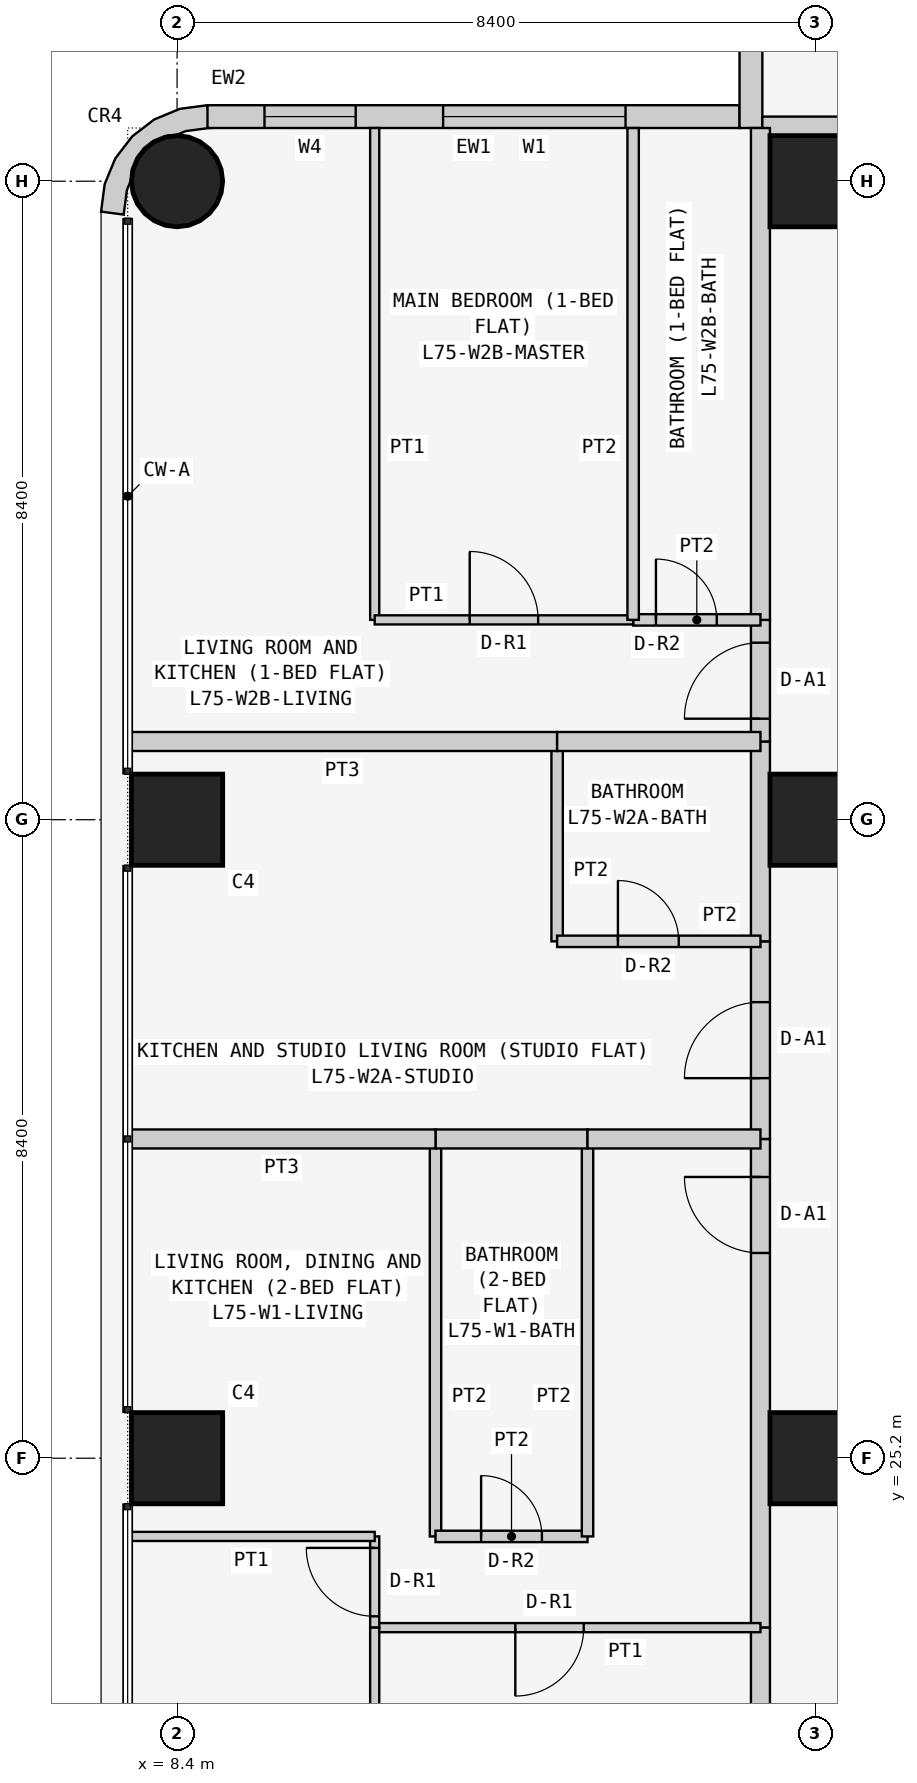
"""IFC4 building model, lengths in metres.
Left out: names, types, materials, properties, quantities, classifications, styles, units other than length and angle.
Written with IfcOpenShell. Run it as: python <this file> out.ifc"""

import sys

from ifc_helpers import new_model, si_unit, direction, frame, frame_2d, origin, origin_2d, place, context, subcontext, project, spatial, polyline, rectangle, circle, outline, extrude, element, fill, save


model = new_model("IFC4")
c1 = context("Model", 3, precision=1e-05, world=origin(), true_north=direction((0.0, 1.0)))
c2 = subcontext(c1, "Body", "Model", "MODEL_VIEW")
j1 = project(units=[si_unit("LENGTHUNIT", "METRE"), si_unit("PLANEANGLEUNIT", "RADIAN")], contexts=[c1])
p1 = place(None, origin())
s1 = spatial("IfcSite", under=j1, at=p1, CompositionType="ELEMENT")
p2 = place(p1, origin())
s2 = spatial("IfcBuilding", under=s1, at=p2, CompositionType="ELEMENT")
p3 = place(p2, frame((0.0, 0.0, 286.5)))
s3 = spatial("IfcBuildingStorey", under=s2, at=p3, CompositionType="ELEMENT", Elevation=286.5)
for number, where, z_axis, x_axis in (
    (1, (8.4, 25.2, 0.0), (0.0, 0.0, 1.0), (1.0, 0.0, 0.0)),
    (2, (8.4, 33.6, 0.0), (0.0, 0.0, 1.0), (1.0, 0.0, 0.0)),
):
    element("IfcColumn", number, at=place(p3, frame(where, z_axis=z_axis, x_axis=x_axis)), inside=s3, PredefinedType="COLUMN", context=c2, shape_type="SweptSolid", body=[
        extrude(rectangle(XDim=1.2, YDim=1.2, at=origin_2d()), origin(), (0.0, 0.0, 1.0), 3.6),
    ])
p4 = place(p3, frame((8.4, 42.0, 0.0), z_axis=(0.0, 0.0, 1.0), x_axis=(1.0, 0.0, 0.0)))
e3 = element("IfcColumn", 3, at=p4, inside=s3, PredefinedType="COLUMN", context=c2, shape_type="SweptSolid", body=[
    extrude(circle(Radius=0.6, at=origin_2d()), origin(), (0.0, 0.0, 1.0), 3.6),
])
for number, where, z_axis, x_axis in (
    (4, (16.8, 25.2, 0.0), (0.0, 0.0, 1.0), (1.0, 0.0, 0.0)),
    (5, (16.8, 33.6, 0.0), (0.0, 0.0, 1.0), (1.0, 0.0, 0.0)),
    (6, (16.8, 42.0, 0.0), (0.0, 0.0, 1.0), (1.0, 0.0, 0.0)),
):
    element("IfcColumn", number, at=place(p3, frame(where, z_axis=z_axis, x_axis=x_axis)), inside=s3, PredefinedType="COLUMN", context=c2, shape_type="SweptSolid", body=[
        extrude(rectangle(XDim=1.2, YDim=1.2, at=origin_2d()), origin(), (0.0, 0.0, 1.0), 3.6),
    ])
p5 = place(p3, frame((15.8, 42.85, 0.0), z_axis=(0.0, 0.0, 1.0), x_axis=(-1.0, 0.0, 0.0)))
e7 = element("IfcWall", 7, at=p5, inside=s3, PredefinedType="SOLIDWALL", context=c2, shape_type="SweptSolid", body=[
    extrude(rectangle(XDim=7.0, YDim=0.3, at=frame_2d((3.5, 0.0))), origin(), (0.0, 0.0, 1.0), 3.45),
])
p6 = place(p5, frame((1.5, 0.0, 0.9)))
e8 = element("IfcOpeningElement", 8, at=p6, cuts=e7, PredefinedType="OPENING", context=c2, shape_type="SweptSolid", body=[
    extrude(rectangle(XDim=2.4, YDim=1.5, at=frame_2d((1.2, 0.75))), frame((0.0, 0.16, 0.0), z_axis=(0.0, -1.0, 0.0), x_axis=(1.0, 0.0, 0.0)), (0.0, 0.0, 1.0), 0.32),
])
p7 = place(p5, frame((5.05, 0.0, 0.9)))
e9 = element("IfcOpeningElement", 9, at=p7, cuts=e7, PredefinedType="OPENING", context=c2, shape_type="SweptSolid", body=[
    extrude(rectangle(XDim=1.2, YDim=1.5, at=frame_2d((0.6, 0.75))), frame((0.0, 0.16, 0.0), z_axis=(0.0, -1.0, 0.0), x_axis=(1.0, 0.0, 0.0)), (0.0, 0.0, 1.0), 0.32),
])
p8 = place(p3, frame((15.95, 50.0, 0.0), z_axis=(0.0, 0.0, 1.0), x_axis=(0.0, -1.0, 0.0)))
e10 = element("IfcWall", 10, at=p8, inside=s3, PredefinedType="SOLIDWALL", context=c2, shape_type="SweptSolid", body=[
    extrude(rectangle(XDim=7.3, YDim=0.3, at=frame_2d((3.65, 0.0))), origin(), (0.0, 0.0, 1.0), 3.45),
])
p9 = place(p8, frame((3.1, 0.0, 0.9)))
e11 = element("IfcOpeningElement", 11, at=p9, cuts=e10, PredefinedType="OPENING", context=c2, shape_type="SweptSolid", body=[
    extrude(rectangle(XDim=2.4, YDim=1.5, at=frame_2d((1.2, 0.75))), frame((0.0, 0.16, 0.0), z_axis=(0.0, -1.0, 0.0), x_axis=(1.0, 0.0, 0.0)), (0.0, 0.0, 1.0), 0.32),
])
p10 = place(p8, frame((0.75, 0.0, 0.9)))
e12 = element("IfcOpeningElement", 12, at=p10, cuts=e10, PredefinedType="OPENING", context=c2, shape_type="SweptSolid", body=[
    extrude(rectangle(XDim=1.2, YDim=1.5, at=frame_2d((0.6, 0.75))), frame((0.0, 0.16, 0.0), z_axis=(0.0, -1.0, 0.0), x_axis=(1.0, 0.0, 0.0)), (0.0, 0.0, 1.0), 0.32),
])
p11 = place(p3, frame((8.762, 42.576, 0.0), z_axis=(0.0, 0.0, 1.0), x_axis=(-0.707106781187, 0.707106781187, 0.0)))
e13 = element("IfcWall", 13, at=p11, inside=s3, PredefinedType="SOLIDWALL", context=c2, shape_type="SweptSolid", body=[
    extrude(outline(polyline([(0.233, 0.114), (0.047, -0.129), (0.033, -0.143), (0.273, -0.327), (0.495, -0.037), (0.635, 0.3), (0.683, 0.663), (0.635, 1.025), (0.495, 1.363), (0.273, 1.653), (0.033, 1.469), (0.047, 1.455), (0.233, 1.212), (0.292, 1.069), (0.358, 1.003), (0.449, 0.783), (0.449, 0.543), (0.358, 0.322), (0.292, 0.257), (0.233, 0.114)])), origin(), (0.0, 0.0, 1.0), 3.45),
])
p12 = place(p3, frame((16.1, 42.725, 0.0), z_axis=(0.0, 0.0, 1.0), x_axis=(1.0, 0.0, 0.0)))
e14 = element("IfcWall", 14, at=p12, inside=s3, PredefinedType="PARTITIONING", context=c2, shape_type="SweptSolid", body=[
    extrude(rectangle(XDim=6.871, YDim=0.25, at=frame_2d((3.436, 0.0))), origin(), (0.0, 0.0, 1.0), 3.45),
])
p13 = place(p3, frame((16.075, 22.971, 0.0), z_axis=(0.0, 0.0, 1.0), x_axis=(0.0, 1.0, 0.0)))
e15 = element("IfcWall", 15, at=p13, inside=s3, PredefinedType="PARTITIONING", context=c2, shape_type="SweptSolid", body=[
    extrude(rectangle(XDim=6.429, YDim=0.25, at=frame_2d((3.214, 0.0))), origin(), (0.0, 0.0, 1.0), 3.45),
])
p14 = place(p13, frame((4.929, 0.0, 0.0)))
e16 = element("IfcOpeningElement", 16, at=p14, cuts=e15, PredefinedType="OPENING", context=c2, shape_type="SweptSolid", body=[
    extrude(rectangle(XDim=1.0, YDim=2.1, at=frame_2d((0.5, 1.05))), frame((0.0, 0.135, 0.0), z_axis=(0.0, -1.0, 0.0), x_axis=(1.0, 0.0, 0.0)), (0.0, 0.0, 1.0), 0.27),
])
p15 = place(p3, frame((16.075, 16.1, 0.0), z_axis=(0.0, 0.0, 1.0), x_axis=(0.0, 1.0, 0.0)))
e17 = element("IfcWall", 17, at=p15, inside=s3, PredefinedType="PARTITIONING", context=c2, shape_type="SweptSolid", body=[
    extrude(rectangle(XDim=6.871, YDim=0.25, at=frame_2d((3.436, 0.0))), origin(), (0.0, 0.0, 1.0), 3.45),
])
p16 = place(p3, frame((16.075, 29.4, 0.0), z_axis=(0.0, 0.0, 1.0), x_axis=(0.0, 1.0, 0.0)))
e18 = element("IfcWall", 18, at=p16, inside=s3, PredefinedType="PARTITIONING", context=c2, shape_type="SweptSolid", body=[
    extrude(rectangle(XDim=2.6, YDim=0.25, at=frame_2d((1.3, 0.0))), origin(), (0.0, 0.0, 1.0), 3.45),
])
p17 = place(p16, frame((0.8, 0.0, 0.0)))
e19 = element("IfcOpeningElement", 19, at=p17, cuts=e18, PredefinedType="OPENING", context=c2, shape_type="SweptSolid", body=[
    extrude(rectangle(XDim=1.0, YDim=2.1, at=frame_2d((0.5, 1.05))), frame((0.0, 0.135, 0.0), z_axis=(0.0, -1.0, 0.0), x_axis=(1.0, 0.0, 0.0)), (0.0, 0.0, 1.0), 0.27),
])
p18 = place(p3, frame((16.075, 32.0, 0.0), z_axis=(0.0, 0.0, 1.0), x_axis=(0.0, 1.0, 0.0)))
e20 = element("IfcWall", 20, at=p18, inside=s3, PredefinedType="PARTITIONING", context=c2, shape_type="SweptSolid", body=[
    extrude(rectangle(XDim=2.629, YDim=0.25, at=frame_2d((1.314, 0.0))), origin(), (0.0, 0.0, 1.0), 3.45),
])
p19 = place(p3, frame((16.075, 34.629, 0.0), z_axis=(0.0, 0.0, 1.0), x_axis=(0.0, 1.0, 0.0)))
e21 = element("IfcWall", 21, at=p19, inside=s3, PredefinedType="PARTITIONING", context=c2, shape_type="SweptSolid", body=[
    extrude(rectangle(XDim=1.6, YDim=0.25, at=frame_2d((0.8, 0.0))), origin(), (0.0, 0.0, 1.0), 3.45),
])
p20 = place(p19, frame((0.3, 0.0, 0.0)))
e22 = element("IfcOpeningElement", 22, at=p20, cuts=e21, PredefinedType="OPENING", context=c2, shape_type="SweptSolid", body=[
    extrude(rectangle(XDim=1.0, YDim=2.1, at=frame_2d((0.5, 1.05))), frame((0.0, 0.135, 0.0), z_axis=(0.0, -1.0, 0.0), x_axis=(1.0, 0.0, 0.0)), (0.0, 0.0, 1.0), 0.27),
])
p21 = place(p3, frame((16.075, 36.229, 0.0), z_axis=(0.0, 0.0, 1.0), x_axis=(0.0, 1.0, 0.0)))
e23 = element("IfcWall", 23, at=p21, inside=s3, PredefinedType="PARTITIONING", context=c2, shape_type="SweptSolid", body=[
    extrude(rectangle(XDim=6.471, YDim=0.25, at=frame_2d((3.235, 0.0))), origin(), (0.0, 0.0, 1.0), 3.45),
])
p22 = place(p3, frame((11.8, 29.4, 0.0), z_axis=(0.0, 0.0, 1.0), x_axis=(0.0, -1.0, 0.0)))
e24 = element("IfcWall", 24, at=p22, inside=s3, PredefinedType="PARTITIONING", context=c2, shape_type="SweptSolid", body=[
    extrude(rectangle(XDim=5.229, YDim=0.15, at=frame_2d((2.615, 0.0))), origin(), (0.0, 0.0, 1.0), 3.45),
])
p23 = place(p3, frame((11.8, 24.171, 0.0), z_axis=(0.0, 0.0, 1.0), x_axis=(1.0, 0.0, 0.0)))
e25 = element("IfcWall", 25, at=p23, inside=s3, PredefinedType="PARTITIONING", context=c2, shape_type="SweptSolid", body=[
    extrude(rectangle(XDim=2.0, YDim=0.15, at=frame_2d((1.0, 0.0))), origin(), (0.0, 0.0, 1.0), 3.45),
])
p24 = place(p23, frame((0.6, 0.0, 0.0)))
e26 = element("IfcOpeningElement", 26, at=p24, cuts=e25, PredefinedType="OPENING", context=c2, shape_type="SweptSolid", body=[
    extrude(rectangle(XDim=0.8, YDim=2.1, at=frame_2d((0.4, 1.05))), frame((0.0, 0.085, 0.0), z_axis=(0.0, -1.0, 0.0), x_axis=(1.0, 0.0, 0.0)), (0.0, 0.0, 1.0), 0.17),
])
p25 = place(p3, frame((13.8, 24.171, 0.0), z_axis=(0.0, 0.0, 1.0), x_axis=(0.0, 1.0, 0.0)))
e27 = element("IfcWall", 27, at=p25, inside=s3, PredefinedType="PARTITIONING", context=c2, shape_type="SweptSolid", body=[
    extrude(rectangle(XDim=5.229, YDim=0.15, at=frame_2d((2.615, 0.0))), origin(), (0.0, 0.0, 1.0), 3.45),
])
p26 = place(p3, frame((13.8, 29.4, 0.0), z_axis=(0.0, 0.0, 1.0), x_axis=(-1.0, 0.0, 0.0)))
e28 = element("IfcWall", 28, at=p26, inside=s3, PredefinedType="PARTITIONING", context=c2, shape_type="SweptSolid", body=[
    extrude(rectangle(XDim=2.0, YDim=0.25, at=frame_2d((1.0, 0.0))), origin(), (0.0, 0.0, 1.0), 3.45),
])
p27 = place(p3, frame((16.075, 22.971, 0.0), z_axis=(0.0, 0.0, 1.0), x_axis=(-1.0, 0.0, 0.0)))
e29 = element("IfcWall", 29, at=p27, inside=s3, PredefinedType="PARTITIONING", context=c2, shape_type="SweptSolid", body=[
    extrude(rectangle(XDim=5.075, YDim=0.12, at=frame_2d((2.538, 0.0))), origin(), (0.0, 0.0, 1.0), 3.45),
])
p28 = place(p27, frame((2.325, 0.0, 0.0)))
e30 = element("IfcOpeningElement", 30, at=p28, cuts=e29, PredefinedType="OPENING", context=c2, shape_type="SweptSolid", body=[
    extrude(rectangle(XDim=0.9, YDim=2.1, at=frame_2d((0.45, 1.05))), frame((0.0, 0.07, 0.0), z_axis=(0.0, -1.0, 0.0), x_axis=(1.0, 0.0, 0.0)), (0.0, 0.0, 1.0), 0.14),
])
p29 = place(p3, frame((11.0, 22.971, 0.0), z_axis=(0.0, 0.0, 1.0), x_axis=(0.0, 1.0, 0.0)))
e31 = element("IfcWall", 31, at=p29, inside=s3, PredefinedType="PARTITIONING", context=c2, shape_type="SweptSolid", body=[
    extrude(rectangle(XDim=1.2, YDim=0.12, at=frame_2d((0.6, 0.0))), origin(), (0.0, 0.0, 1.0), 3.45),
])
p30 = place(p29, frame((0.149, 0.0, 0.0)))
e32 = element("IfcOpeningElement", 32, at=p30, cuts=e31, PredefinedType="OPENING", context=c2, shape_type="SweptSolid", body=[
    extrude(rectangle(XDim=0.9, YDim=2.1, at=frame_2d((0.45, 1.05))), frame((0.0, 0.07, 0.0), z_axis=(0.0, -1.0, 0.0), x_axis=(1.0, 0.0, 0.0)), (0.0, 0.0, 1.0), 0.14),
])
p31 = place(p3, frame((11.0, 24.171, 0.0), z_axis=(0.0, 0.0, 1.0), x_axis=(-1.0, 0.0, 0.0)))
e33 = element("IfcWall", 33, at=p31, inside=s3, PredefinedType="PARTITIONING", context=c2, shape_type="SweptSolid", body=[
    extrude(rectangle(XDim=3.25, YDim=0.12, at=frame_2d((1.625, 0.0))), origin(), (0.0, 0.0, 1.0), 3.45),
])
p32 = place(p3, frame((7.75, 29.4, 0.0), z_axis=(0.0, 0.0, 1.0), x_axis=(1.0, 0.0, 0.0)))
e34 = element("IfcWall", 34, at=p32, inside=s3, PredefinedType="PARTITIONING", context=c2, shape_type="SweptSolid", body=[
    extrude(rectangle(XDim=4.05, YDim=0.25, at=frame_2d((2.025, 0.0))), origin(), (0.0, 0.0, 1.0), 3.45),
])
p33 = place(p3, frame((13.8, 29.4, 0.0), z_axis=(0.0, 0.0, 1.0), x_axis=(1.0, 0.0, 0.0)))
e35 = element("IfcWall", 35, at=p33, inside=s3, PredefinedType="PARTITIONING", context=c2, shape_type="SweptSolid", body=[
    extrude(rectangle(XDim=2.275, YDim=0.25, at=frame_2d((1.137, 0.0))), origin(), (0.0, 0.0, 1.0), 3.45),
])
p34 = place(p3, frame((11.0, 22.971, 0.0), z_axis=(0.0, 0.0, 1.0), x_axis=(0.0, -1.0, 0.0)))
e36 = element("IfcWall", 36, at=p34, inside=s3, PredefinedType="PARTITIONING", context=c2, shape_type="SweptSolid", body=[
    extrude(rectangle(XDim=6.871, YDim=0.12, at=frame_2d((3.436, 0.0))), origin(), (0.0, 0.0, 1.0), 3.45),
])
p35 = place(p3, frame((13.4, 34.629, 0.0), z_axis=(0.0, 0.0, 1.0), x_axis=(0.0, -1.0, 0.0)))
e37 = element("IfcWall", 37, at=p35, inside=s3, PredefinedType="PARTITIONING", context=c2, shape_type="SweptSolid", body=[
    extrude(rectangle(XDim=2.629, YDim=0.15, at=frame_2d((1.314, 0.0))), origin(), (0.0, 0.0, 1.0), 3.45),
])
p36 = place(p3, frame((13.4, 32.0, 0.0), z_axis=(0.0, 0.0, 1.0), x_axis=(1.0, 0.0, 0.0)))
e38 = element("IfcWall", 38, at=p36, inside=s3, PredefinedType="PARTITIONING", context=c2, shape_type="SweptSolid", body=[
    extrude(rectangle(XDim=2.675, YDim=0.15, at=frame_2d((1.337, 0.0))), origin(), (0.0, 0.0, 1.0), 3.45),
])
p37 = place(p36, frame((0.8, 0.0, 0.0)))
e39 = element("IfcOpeningElement", 39, at=p37, cuts=e38, PredefinedType="OPENING", context=c2, shape_type="SweptSolid", body=[
    extrude(rectangle(XDim=0.8, YDim=2.1, at=frame_2d((0.4, 1.05))), frame((0.0, 0.085, 0.0), z_axis=(0.0, -1.0, 0.0), x_axis=(1.0, 0.0, 0.0)), (0.0, 0.0, 1.0), 0.17),
])
p38 = place(p3, frame((7.75, 34.629, 0.0), z_axis=(0.0, 0.0, 1.0), x_axis=(1.0, 0.0, 0.0)))
e40 = element("IfcWall", 40, at=p38, inside=s3, PredefinedType="PARTITIONING", context=c2, shape_type="SweptSolid", body=[
    extrude(rectangle(XDim=5.65, YDim=0.25, at=frame_2d((2.825, 0.0))), origin(), (0.0, 0.0, 1.0), 3.45),
])
p39 = place(p3, frame((13.4, 34.629, 0.0), z_axis=(0.0, 0.0, 1.0), x_axis=(1.0, 0.0, 0.0)))
e41 = element("IfcWall", 41, at=p39, inside=s3, PredefinedType="PARTITIONING", context=c2, shape_type="SweptSolid", body=[
    extrude(rectangle(XDim=2.675, YDim=0.25, at=frame_2d((1.337, 0.0))), origin(), (0.0, 0.0, 1.0), 3.45),
])
p40 = place(p3, frame((14.4, 36.229, 0.0), z_axis=(0.0, 0.0, 1.0), x_axis=(1.0, 0.0, 0.0)))
e42 = element("IfcWall", 42, at=p40, inside=s3, PredefinedType="PARTITIONING", context=c2, shape_type="SweptSolid", body=[
    extrude(rectangle(XDim=1.675, YDim=0.15, at=frame_2d((0.837, 0.0))), origin(), (0.0, 0.0, 1.0), 3.45),
])
p41 = place(p40, frame((0.3, 0.0, 0.0)))
e43 = element("IfcOpeningElement", 43, at=p41, cuts=e42, PredefinedType="OPENING", context=c2, shape_type="SweptSolid", body=[
    extrude(rectangle(XDim=0.8, YDim=2.1, at=frame_2d((0.4, 1.05))), frame((0.0, 0.085, 0.0), z_axis=(0.0, -1.0, 0.0), x_axis=(1.0, 0.0, 0.0)), (0.0, 0.0, 1.0), 0.17),
])
p42 = place(p3, frame((11.0, 42.7, 0.0), z_axis=(0.0, 0.0, 1.0), x_axis=(0.0, -1.0, 0.0)))
e44 = element("IfcWall", 44, at=p42, inside=s3, PredefinedType="PARTITIONING", context=c2, shape_type="SweptSolid", body=[
    extrude(rectangle(XDim=6.471, YDim=0.12, at=frame_2d((3.235, 0.0))), origin(), (0.0, 0.0, 1.0), 3.45),
])
p43 = place(p3, frame((11.0, 36.229, 0.0), z_axis=(0.0, 0.0, 1.0), x_axis=(1.0, 0.0, 0.0)))
e45 = element("IfcWall", 45, at=p43, inside=s3, PredefinedType="PARTITIONING", context=c2, shape_type="SweptSolid", body=[
    extrude(rectangle(XDim=3.4, YDim=0.12, at=frame_2d((1.7, 0.0))), origin(), (0.0, 0.0, 1.0), 3.45),
])
p44 = place(p43, frame((1.25, 0.0, 0.0)))
e46 = element("IfcOpeningElement", 46, at=p44, cuts=e45, PredefinedType="OPENING", context=c2, shape_type="SweptSolid", body=[
    extrude(rectangle(XDim=0.9, YDim=2.1, at=frame_2d((0.45, 1.05))), frame((0.0, 0.07, 0.0), z_axis=(0.0, -1.0, 0.0), x_axis=(1.0, 0.0, 0.0)), (0.0, 0.0, 1.0), 0.14),
])
p45 = place(p3, frame((14.4, 36.229, 0.0), z_axis=(0.0, 0.0, 1.0), x_axis=(0.0, 1.0, 0.0)))
e47 = element("IfcWall", 47, at=p45, inside=s3, PredefinedType="PARTITIONING", context=c2, shape_type="SweptSolid", body=[
    extrude(rectangle(XDim=6.471, YDim=0.15, at=frame_2d((3.235, 0.0))), origin(), (0.0, 0.0, 1.0), 3.45),
])
p46 = place(p6, origin())
e48 = element("IfcWindow", 48, at=p46, inside=s3, PartitioningType="SINGLE_PANEL", PredefinedType="WINDOW", context=c2, shape_type="SweptSolid", body=[
    extrude(rectangle(XDim=2.4, YDim=1.5, at=frame_2d((1.2, 0.75))), frame((0.0, 0.03, 0.0), z_axis=(0.0, -1.0, 0.0), x_axis=(1.0, 0.0, 0.0)), (0.0, 0.0, 1.0), 0.06),
])
fill(e8, e48)
p47 = place(p7, origin())
e49 = element("IfcWindow", 49, at=p47, inside=s3, PartitioningType="SINGLE_PANEL", PredefinedType="WINDOW", context=c2, shape_type="SweptSolid", body=[
    extrude(rectangle(XDim=1.2, YDim=1.5, at=frame_2d((0.6, 0.75))), frame((0.0, 0.03, 0.0), z_axis=(0.0, -1.0, 0.0), x_axis=(1.0, 0.0, 0.0)), (0.0, 0.0, 1.0), 0.06),
])
fill(e9, e49)
p48 = place(p14, origin())
e50 = element("IfcDoor", 50, at=p48, inside=s3, OperationType="SINGLE_SWING_RIGHT", PredefinedType="DOOR", context=c2, shape_type="SweptSolid", body=[
    extrude(rectangle(XDim=1.0, YDim=2.1, at=frame_2d((0.5, 1.05))), frame((0.0, 0.025, 0.0), z_axis=(0.0, -1.0, 0.0), x_axis=(1.0, 0.0, 0.0)), (0.0, 0.0, 1.0), 0.05),
])
fill(e16, e50)
p49 = place(p24, origin())
e51 = element("IfcDoor", 51, at=p49, inside=s3, OperationType="SINGLE_SWING_LEFT", PredefinedType="DOOR", context=c2, shape_type="SweptSolid", body=[
    extrude(rectangle(XDim=0.8, YDim=2.1, at=frame_2d((0.4, 1.05))), frame((0.0, 0.025, 0.0), z_axis=(0.0, -1.0, 0.0), x_axis=(1.0, 0.0, 0.0)), (0.0, 0.0, 1.0), 0.05),
])
fill(e26, e51)
p50 = place(p28, origin())
e52 = element("IfcDoor", 52, at=p50, inside=s3, OperationType="SINGLE_SWING_RIGHT", PredefinedType="DOOR", context=c2, shape_type="SweptSolid", body=[
    extrude(rectangle(XDim=0.9, YDim=2.1, at=frame_2d((0.45, 1.05))), frame((0.0, 0.025, 0.0), z_axis=(0.0, -1.0, 0.0), x_axis=(1.0, 0.0, 0.0)), (0.0, 0.0, 1.0), 0.05),
])
fill(e30, e52)
p51 = place(p30, origin())
e53 = element("IfcDoor", 53, at=p51, inside=s3, OperationType="SINGLE_SWING_RIGHT", PredefinedType="DOOR", context=c2, shape_type="SweptSolid", body=[
    extrude(rectangle(XDim=0.9, YDim=2.1, at=frame_2d((0.45, 1.05))), frame((0.0, 0.025, 0.0), z_axis=(0.0, -1.0, 0.0), x_axis=(1.0, 0.0, 0.0)), (0.0, 0.0, 1.0), 0.05),
])
fill(e32, e53)
p52 = place(p17, origin())
e54 = element("IfcDoor", 54, at=p52, inside=s3, OperationType="SINGLE_SWING_LEFT", PredefinedType="DOOR", context=c2, shape_type="SweptSolid", body=[
    extrude(rectangle(XDim=1.0, YDim=2.1, at=frame_2d((0.5, 1.05))), frame((0.0, 0.025, 0.0), z_axis=(0.0, -1.0, 0.0), x_axis=(1.0, 0.0, 0.0)), (0.0, 0.0, 1.0), 0.05),
])
fill(e19, e54)
p53 = place(p37, origin())
e55 = element("IfcDoor", 55, at=p53, inside=s3, OperationType="SINGLE_SWING_LEFT", PredefinedType="DOOR", context=c2, shape_type="SweptSolid", body=[
    extrude(rectangle(XDim=0.8, YDim=2.1, at=frame_2d((0.4, 1.05))), frame((0.0, 0.025, 0.0), z_axis=(0.0, -1.0, 0.0), x_axis=(1.0, 0.0, 0.0)), (0.0, 0.0, 1.0), 0.05),
])
fill(e39, e55)
p54 = place(p20, origin())
e56 = element("IfcDoor", 56, at=p54, inside=s3, OperationType="SINGLE_SWING_LEFT", PredefinedType="DOOR", context=c2, shape_type="SweptSolid", body=[
    extrude(rectangle(XDim=1.0, YDim=2.1, at=frame_2d((0.5, 1.05))), frame((0.0, 0.025, 0.0), z_axis=(0.0, -1.0, 0.0), x_axis=(1.0, 0.0, 0.0)), (0.0, 0.0, 1.0), 0.05),
])
fill(e22, e56)
p55 = place(p41, origin())
e57 = element("IfcDoor", 57, at=p55, inside=s3, OperationType="SINGLE_SWING_LEFT", PredefinedType="DOOR", context=c2, shape_type="SweptSolid", body=[
    extrude(rectangle(XDim=0.8, YDim=2.1, at=frame_2d((0.4, 1.05))), frame((0.0, 0.025, 0.0), z_axis=(0.0, -1.0, 0.0), x_axis=(1.0, 0.0, 0.0)), (0.0, 0.0, 1.0), 0.05),
])
fill(e43, e57)
p56 = place(p44, origin())
e58 = element("IfcDoor", 58, at=p56, inside=s3, OperationType="SINGLE_SWING_LEFT", PredefinedType="DOOR", context=c2, shape_type="SweptSolid", body=[
    extrude(rectangle(XDim=0.9, YDim=2.1, at=frame_2d((0.45, 1.05))), frame((0.0, 0.025, 0.0), z_axis=(0.0, -1.0, 0.0), x_axis=(1.0, 0.0, 0.0)), (0.0, 0.0, 1.0), 0.05),
])
fill(e46, e58)
save(model, sys.argv[1])
